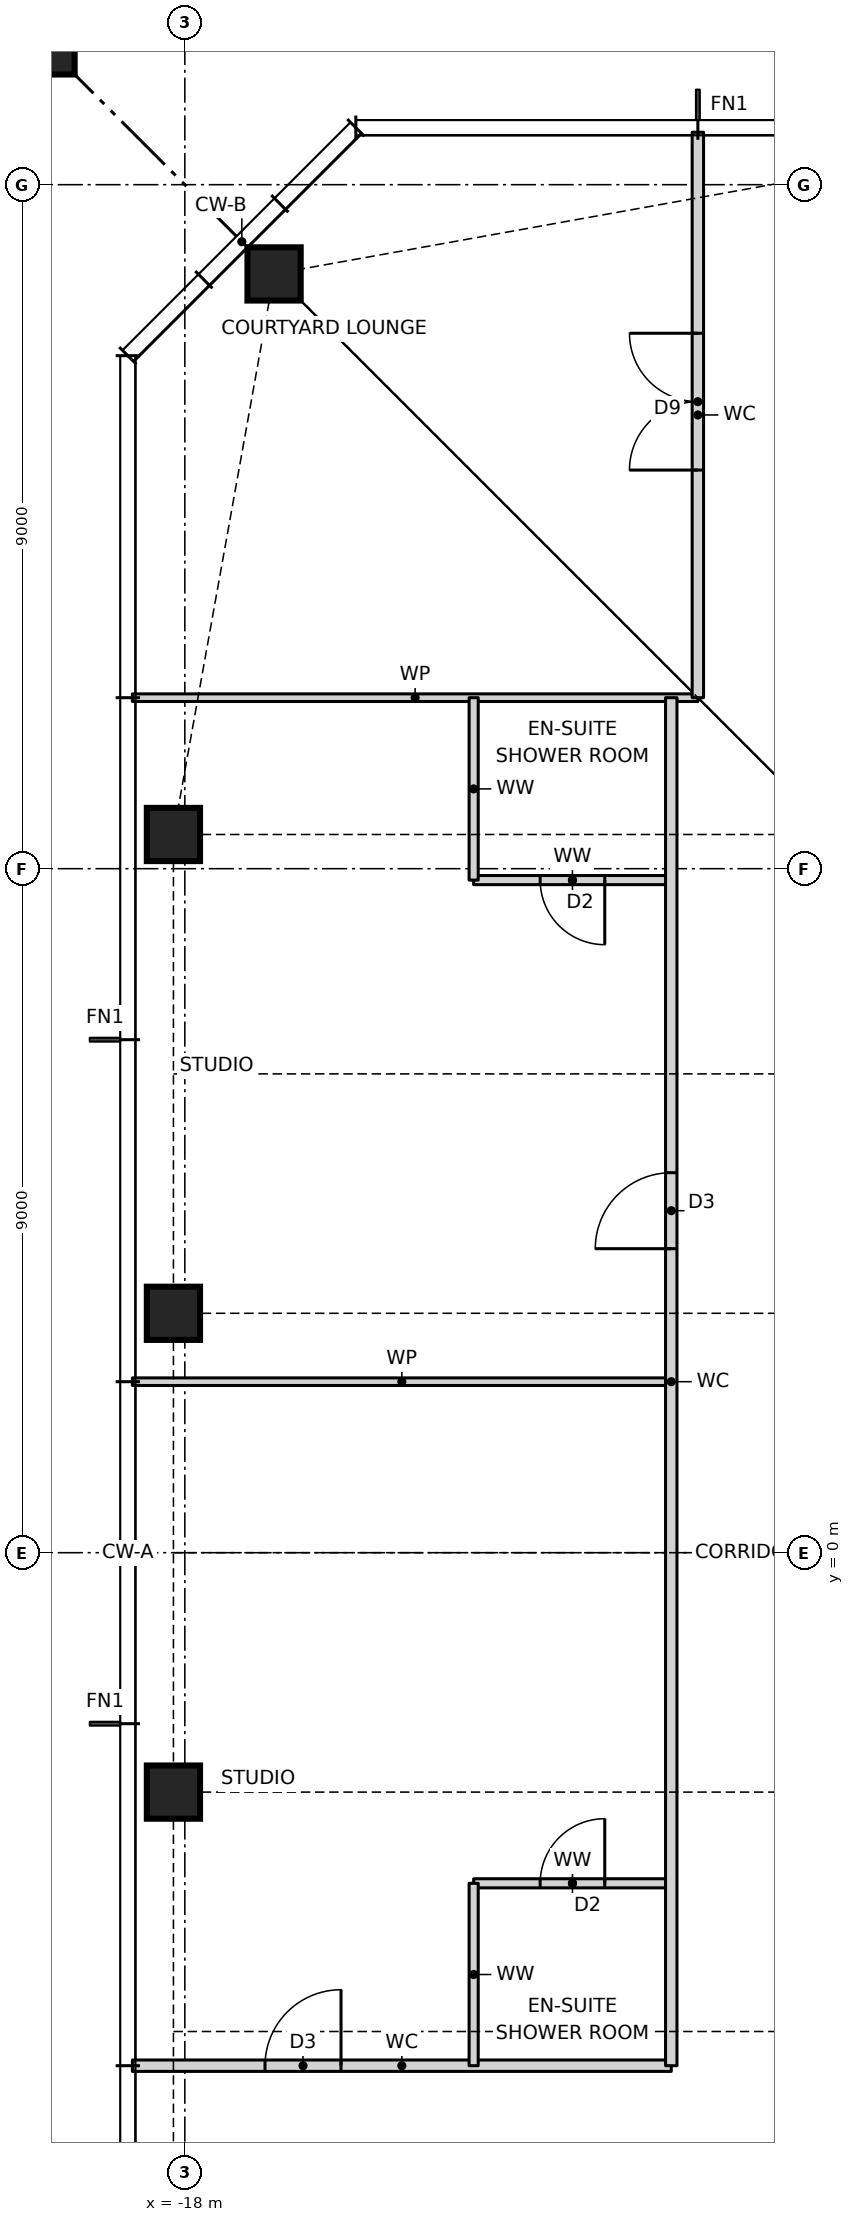
"""IFC4 building model, lengths in metres.
Left out: names, types, materials, properties, quantities, classifications, styles, units other than length and angle.
Written with IfcOpenShell. Run it as: python <this file> out.ifc"""

import sys

from ifc_helpers import new_model, si_unit, direction, frame, frame_2d, origin, origin_2d, place, context, subcontext, project, spatial, rectangle, hollow_rectangle, i_section, extrude, element, fill, save


model = new_model("IFC4")
c1 = context("Model", 3, precision=1e-05, world=origin(), true_north=direction((0.0, 1.0)))
c2 = subcontext(c1, "Body", "Model", "MODEL_VIEW")
j1 = project(units=[si_unit("LENGTHUNIT", "METRE"), si_unit("PLANEANGLEUNIT", "RADIAN")], contexts=[c1])
p1 = place(None, origin())
s1 = spatial("IfcSite", under=j1, at=p1, CompositionType="ELEMENT")
p2 = place(p1, origin())
s2 = spatial("IfcBuilding", under=s1, at=p2, CompositionType="ELEMENT")
p3 = place(p2, frame((0.0, 0.0, 195.0)))
s3 = spatial("IfcBuildingStorey", under=s2, at=p3, CompositionType="ELEMENT", Elevation=195.0)
for number, where, z_axis, x_axis in (
    (1, (-16.826, 16.826, 0.0), (0.0, 0.0, 1.0), (1.0, 0.0, 0.0)),
    (2, (-18.15, 9.45, 0.0), (0.0, 0.0, 1.0), (1.0, 0.0, 0.0)),
    (3, (-18.15, 3.15, 0.0), (0.0, 0.0, 1.0), (1.0, 0.0, 0.0)),
    (4, (-18.15, -3.15, 0.0), (0.0, 0.0, 1.0), (1.0, 0.0, 0.0)),
):
    element("IfcColumn", number, at=place(p3, frame(where, z_axis=z_axis, x_axis=x_axis)), inside=s3, PredefinedType="COLUMN", context=c2, shape_type="SweptSolid", body=[
        extrude(hollow_rectangle(XDim=0.7, YDim=0.7, WallThickness=0.06, at=origin_2d()), origin(), (0.0, 0.0, 1.0), 3.5),
    ])
p4 = place(p3, frame((-21.65, 21.65, 0.0), z_axis=(0.0, 0.0, 1.0), x_axis=(1.0, 0.0, 0.0)))
e5 = element("IfcColumn", 5, at=p4, inside=s3, PredefinedType="COLUMN", context=c2, shape_type="SweptSolid", body=[
    extrude(rectangle(XDim=4.4, YDim=4.4, at=origin_2d()), origin(), (0.0, 0.0, 1.0), 3.5),
    extrude(i_section(OverallWidth=0.478, OverallDepth=0.599, WebThickness=0.1, FlangeThickness=0.14, at=origin_2d()), origin(), (0.0, 0.0, 1.0), 3.5),
])
p5 = place(p3, frame((-18.69, -6.75, 0.0), z_axis=(0.0, 0.0, 1.0), x_axis=(1.0, 0.0, 0.0)))
e6 = element("IfcWall", 6, at=p5, inside=s3, PredefinedType="PARTITIONING", context=c2, shape_type="SweptSolid", body=[
    extrude(rectangle(XDim=7.09, YDim=0.15, at=frame_2d((3.545, 0.0))), origin(), (0.0, 0.0, 1.0), 3.27),
])
p6 = place(p5, frame((1.745, 0.0, 0.0)))
e7 = element("IfcOpeningElement", 7, at=p6, cuts=e6, PredefinedType="OPENING", context=c2, shape_type="SweptSolid", body=[
    extrude(rectangle(XDim=1.0, YDim=2.1, at=frame_2d((0.5, 1.05))), frame((0.0, 0.085, 0.0), z_axis=(0.0, -1.0, 0.0), x_axis=(1.0, 0.0, 0.0)), (0.0, 0.0, 1.0), 0.17),
])
p7 = place(p3, frame((-14.2, -4.35, 0.0), z_axis=(0.0, 0.0, 1.0), x_axis=(1.0, 0.0, 0.0)))
e8 = element("IfcWall", 8, at=p7, inside=s3, PredefinedType="PARTITIONING", context=c2, shape_type="SweptSolid", body=[
    extrude(rectangle(XDim=2.6, YDim=0.12, at=frame_2d((1.3, 0.0))), origin(), (0.0, 0.0, 1.0), 3.27),
])
p8 = place(p7, frame((0.875, 0.0, 0.0)))
e9 = element("IfcOpeningElement", 9, at=p8, cuts=e8, PredefinedType="OPENING", context=c2, shape_type="SweptSolid", body=[
    extrude(rectangle(XDim=0.85, YDim=2.1, at=frame_2d((0.425, 1.05))), frame((0.0, 0.07, 0.0), z_axis=(0.0, -1.0, 0.0), x_axis=(1.0, 0.0, 0.0)), (0.0, 0.0, 1.0), 0.14),
])
p9 = place(p3, frame((-18.69, 2.25, 0.0), z_axis=(0.0, 0.0, 1.0), x_axis=(1.0, 0.0, 0.0)))
e10 = element("IfcWall", 10, at=p9, inside=s3, PredefinedType="PARTITIONING", context=c2, shape_type="SweptSolid", body=[
    extrude(rectangle(XDim=7.09, YDim=0.1, at=frame_2d((3.545, 0.0))), origin(), (0.0, 0.0, 1.0), 3.27),
])
p10 = place(p3, frame((-14.2, 8.85, 0.0), z_axis=(0.0, 0.0, 1.0), x_axis=(1.0, 0.0, 0.0)))
e11 = element("IfcWall", 11, at=p10, inside=s3, PredefinedType="PARTITIONING", context=c2, shape_type="SweptSolid", body=[
    extrude(rectangle(XDim=2.6, YDim=0.12, at=frame_2d((1.3, 0.0))), origin(), (0.0, 0.0, 1.0), 3.27),
])
p11 = place(p10, frame((0.875, 0.0, 0.0)))
e12 = element("IfcOpeningElement", 12, at=p11, cuts=e11, PredefinedType="OPENING", context=c2, shape_type="SweptSolid", body=[
    extrude(rectangle(XDim=0.85, YDim=2.1, at=frame_2d((0.425, 1.05))), frame((0.0, 0.07, 0.0), z_axis=(0.0, -1.0, 0.0), x_axis=(1.0, 0.0, 0.0)), (0.0, 0.0, 1.0), 0.14),
])
p12 = place(p3, frame((-18.69, 11.25, 0.0), z_axis=(0.0, 0.0, 1.0), x_axis=(1.0, 0.0, 0.0)))
e13 = element("IfcWall", 13, at=p12, inside=s3, PredefinedType="PARTITIONING", context=c2, shape_type="SweptSolid", body=[
    extrude(rectangle(XDim=7.44, YDim=0.1, at=frame_2d((3.72, 0.0))), origin(), (0.0, 0.0, 1.0), 3.27),
])
p13 = place(p3, frame((-11.25, 11.25, 0.0), z_axis=(0.0, 0.0, 1.0), x_axis=(0.0, 1.0, 0.0)))
e14 = element("IfcWall", 14, at=p13, inside=s3, PredefinedType="PARTITIONING", context=c2, shape_type="SweptSolid", body=[
    extrude(rectangle(XDim=7.44, YDim=0.15, at=frame_2d((3.72, 0.0))), origin(), (0.0, 0.0, 1.0), 3.27),
])
p14 = place(p13, frame((2.995, 0.0, 0.0)))
e15 = element("IfcOpeningElement", 15, at=p14, cuts=e14, PredefinedType="OPENING", context=c2, shape_type="SweptSolid", body=[
    extrude(rectangle(XDim=1.8, YDim=2.1, at=frame_2d((0.9, 1.05))), frame((0.0, 0.085, 0.0), z_axis=(0.0, -1.0, 0.0), x_axis=(1.0, 0.0, 0.0)), (0.0, 0.0, 1.0), 0.17),
])
p15 = place(p3, frame((-11.6, -6.75, 0.0), z_axis=(0.0, 0.0, 1.0), x_axis=(0.0, 1.0, 0.0)))
e16 = element("IfcWall", 16, at=p15, inside=s3, PredefinedType="PARTITIONING", context=c2, shape_type="SweptSolid", body=[
    extrude(rectangle(XDim=18.0, YDim=0.15, at=frame_2d((9.0, 0.0))), origin(), (0.0, 0.0, 1.0), 3.27),
])
p16 = place(p15, frame((10.75, 0.0, 0.0)))
e17 = element("IfcOpeningElement", 17, at=p16, cuts=e16, PredefinedType="OPENING", context=c2, shape_type="SweptSolid", body=[
    extrude(rectangle(XDim=1.0, YDim=2.1, at=frame_2d((0.5, 1.05))), frame((0.0, 0.085, 0.0), z_axis=(0.0, -1.0, 0.0), x_axis=(1.0, 0.0, 0.0)), (0.0, 0.0, 1.0), 0.17),
])
for number, where, z_axis, x_axis in (
    (18, (-14.2, -6.75, 0.0), (0.0, 0.0, 1.0), (0.0, 1.0, 0.0)),
    (19, (-14.2, 8.85, 0.0), (0.0, 0.0, 1.0), (0.0, 1.0, 0.0)),
):
    element("IfcWall", number, at=place(p3, frame(where, z_axis=z_axis, x_axis=x_axis)), inside=s3, PredefinedType="PARTITIONING", context=c2, shape_type="SweptSolid", body=[
        extrude(rectangle(XDim=2.4, YDim=0.12, at=frame_2d((1.2, 0.0))), origin(), (0.0, 0.0, 1.0), 3.27),
    ])
p17 = place(p16, origin())
e20 = element("IfcDoor", 20, at=p17, inside=s3, OperationType="SINGLE_SWING_LEFT", PredefinedType="DOOR", context=c2, shape_type="SweptSolid", body=[
    extrude(rectangle(XDim=1.0, YDim=2.1, at=frame_2d((0.5, 1.05))), frame((0.0, 0.025, 0.0), z_axis=(0.0, -1.0, 0.0), x_axis=(1.0, 0.0, 0.0)), (0.0, 0.0, 1.0), 0.05),
])
fill(e17, e20)
p18 = place(p11, frame((0.85, 0.0, 0.0), z_axis=(0.0, 0.0, 1.0), x_axis=(-1.0, 0.0, 0.0)))
e21 = element("IfcDoor", 21, at=p18, inside=s3, OperationType="SINGLE_SWING_LEFT", PredefinedType="DOOR", context=c2, shape_type="SweptSolid", body=[
    extrude(rectangle(XDim=0.85, YDim=2.1, at=frame_2d((0.425, 1.05))), frame((0.0, 0.025, 0.0), z_axis=(0.0, -1.0, 0.0), x_axis=(1.0, 0.0, 0.0)), (0.0, 0.0, 1.0), 0.05),
])
fill(e12, e21)
p19 = place(p6, origin())
e22 = element("IfcDoor", 22, at=p19, inside=s3, OperationType="SINGLE_SWING_RIGHT", PredefinedType="DOOR", context=c2, shape_type="SweptSolid", body=[
    extrude(rectangle(XDim=1.0, YDim=2.1, at=frame_2d((0.5, 1.05))), frame((0.0, 0.025, 0.0), z_axis=(0.0, -1.0, 0.0), x_axis=(1.0, 0.0, 0.0)), (0.0, 0.0, 1.0), 0.05),
])
fill(e7, e22)
p20 = place(p8, origin())
e23 = element("IfcDoor", 23, at=p20, inside=s3, OperationType="SINGLE_SWING_RIGHT", PredefinedType="DOOR", context=c2, shape_type="SweptSolid", body=[
    extrude(rectangle(XDim=0.85, YDim=2.1, at=frame_2d((0.425, 1.05))), frame((0.0, 0.025, 0.0), z_axis=(0.0, -1.0, 0.0), x_axis=(1.0, 0.0, 0.0)), (0.0, 0.0, 1.0), 0.05),
])
fill(e9, e23)
p21 = place(p14, origin())
e24 = element("IfcDoor", 24, at=p21, inside=s3, OperationType="DOUBLE_DOOR_SINGLE_SWING", PredefinedType="DOOR", context=c2, shape_type="SweptSolid", body=[
    extrude(rectangle(XDim=1.8, YDim=2.1, at=frame_2d((0.9, 1.05))), frame((0.0, 0.025, 0.0), z_axis=(0.0, -1.0, 0.0), x_axis=(1.0, 0.0, 0.0)), (0.0, 0.0, 1.0), 0.05),
])
fill(e15, e24)
save(model, sys.argv[1])
